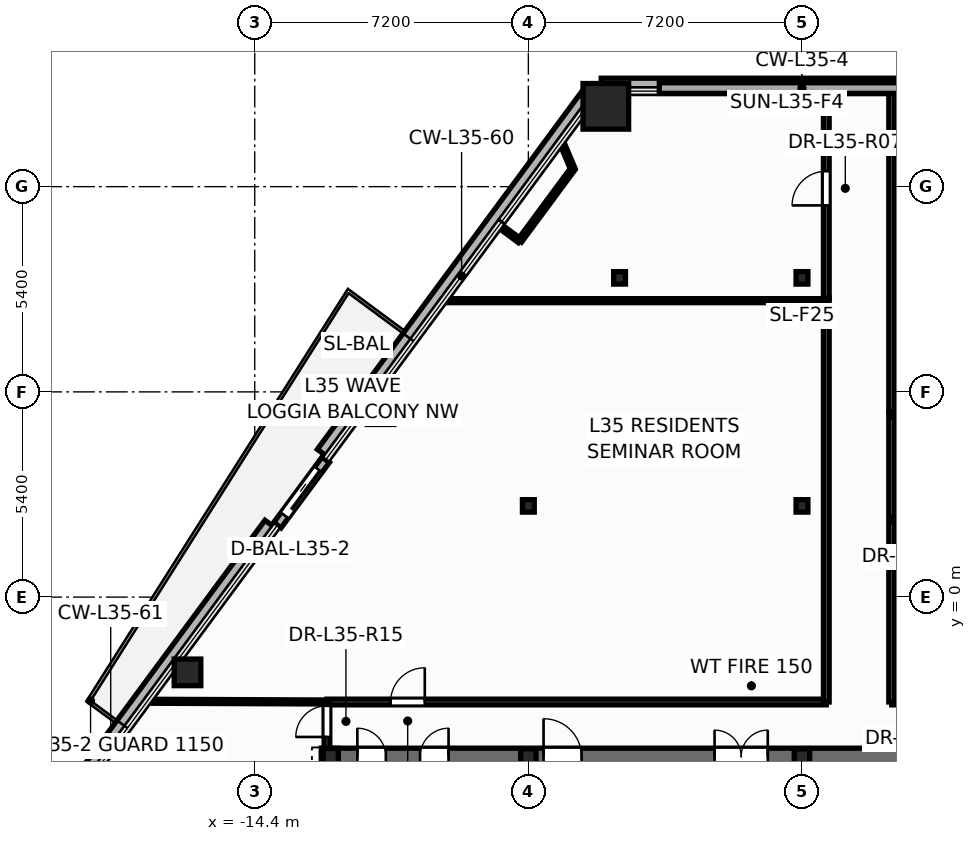
"""IFC4 building model, lengths in metres.
Left out: names, types, materials, properties, quantities, classifications, styles, units other than length and angle.
Written with IfcOpenShell. Run it as: python <this file> out.ifc"""

import sys

from ifc_helpers import new_model, si_unit, direction, frame, frame_2d, origin, origin_2d, place, context, subcontext, project, spatial, rectangle, hollow_rectangle, hollow_circle, i_section, extrude, element, fill, save


model = new_model("IFC4")
c1 = context("Model", 3, precision=1e-05, world=origin(), true_north=direction((0.0, 1.0)))
c2 = subcontext(c1, "Body", "Model", "MODEL_VIEW")
j1 = project(units=[si_unit("LENGTHUNIT", "METRE"), si_unit("PLANEANGLEUNIT", "RADIAN")], contexts=[c1])
p1 = place(None, origin())
s1 = spatial("IfcSite", under=j1, at=p1, CompositionType="ELEMENT")
p2 = place(p1, origin())
s2 = spatial("IfcBuilding", under=s1, at=p2, CompositionType="ELEMENT")
p3 = place(p2, frame((0.0, 0.0, 136.5)))
s3 = spatial("IfcBuildingStorey", under=s2, at=p3, CompositionType="ELEMENT", Elevation=136.5)
p4 = place(p3, frame((-5.162, 12.914, 0.0), z_axis=(0.0, 0.0, 1.0), x_axis=(1.0, 0.0, 0.0)))
e1 = element("IfcColumn", 1, at=p4, inside=s3, PredefinedType="COLUMN", context=c2, shape_type="SweptSolid", body=[
    extrude(hollow_rectangle(XDim=1.2, YDim=1.2, WallThickness=0.055, at=origin_2d()), origin(), (0.0, 0.0, 1.0), 3.6),
])
for number, where, z_axis, x_axis in (
    (2, (-11.089, 4.894, 0.0), (0.0, 0.0, 1.0), (1.0, 0.0, 0.0)),
    (3, (-16.169, -1.98, 0.0), (0.0, 0.0, 1.0), (1.0, 0.0, 0.0)),
):
    element("IfcColumn", number, at=place(p3, frame(where, z_axis=z_axis, x_axis=x_axis)), inside=s3, PredefinedType="COLUMN", context=c2, shape_type="SweptSolid", body=[
        extrude(hollow_circle(Radius=0.35, WallThickness=0.03, at=origin_2d()), origin(), (0.0, 0.0, 1.0), 3.6),
    ])
p5 = place(p3, frame((-12.4, -4.2, 0.0), z_axis=(0.0, 0.0, 1.0), x_axis=(1.0, 0.0, 0.0)))
e4 = element("IfcColumn", 4, at=p5, inside=s3, PredefinedType="COLUMN", context=c2, shape_type="SweptSolid", body=[
    extrude(i_section(OverallWidth=0.4, OverallDepth=0.44, WebThickness=0.028, FlangeThickness=0.04, at=origin_2d()), origin(), (0.0, 0.0, 1.0), 3.6),
])
for number, where, z_axis, x_axis in (
    (5, (-7.2, -4.2, 0.0), (0.0, 0.0, 1.0), (1.0, 0.0, 0.0)),
    (6, (0.0, -4.2, 0.0), (0.0, 0.0, 1.0), (1.0, 0.0, 0.0)),
):
    element("IfcColumn", number, at=place(p3, frame(where, z_axis=z_axis, x_axis=x_axis)), inside=s3, PredefinedType="PILASTER", context=c2, shape_type="SweptSolid", body=[
        extrude(i_section(OverallWidth=0.405, OverallDepth=0.414, WebThickness=0.022, FlangeThickness=0.032, at=origin_2d()), origin(), (0.0, 0.0, 1.0), 3.6),
    ])
for number, where, z_axis, x_axis in (
    (7, (-7.2, 2.4, 0.0), (0.0, 0.0, 1.0), (1.0, 0.0, 0.0)),
    (8, (0.0, 2.4, 0.0), (0.0, 0.0, 1.0), (1.0, 0.0, 0.0)),
    (9, (-4.8, 8.4, 0.0), (0.0, 0.0, 1.0), (1.0, 0.0, 0.0)),
    (10, (0.0, 8.4, 0.0), (0.0, 0.0, 1.0), (1.0, 0.0, 0.0)),
):
    element("IfcColumn", number, at=place(p3, frame(where, z_axis=z_axis, x_axis=x_axis)), inside=s3, PredefinedType="COLUMN", context=c2, shape_type="SweptSolid", body=[
        extrude(i_section(OverallWidth=0.311, OverallDepth=0.327, WebThickness=0.016, FlangeThickness=0.025, at=origin_2d()), origin(), (0.0, 0.0, 1.0), 3.6),
    ])
p6 = place(p3, frame((5.283, 13.473, -0.2), z_axis=(0.0, 0.0, 1.0), x_axis=(-1.0, 0.0, 0.0)))
e11 = element("IfcWall", 11, at=p6, inside=s3, PredefinedType="PARAPET", context=c2, shape_type="SweptSolid", body=[
    extrude(rectangle(XDim=10.566, YDim=0.36, at=frame_2d((5.283, 0.0))), origin(), (0.0, 0.0, 1.0), 0.38),
])
p7 = place(p3, frame((-5.563, 13.312, -0.2), z_axis=(0.0, 0.0, 1.0), x_axis=(-0.594365575478, -0.804194978029, 0.0)))
e12 = element("IfcWall", 12, at=p7, inside=s3, PredefinedType="PARAPET", context=c2, shape_type="SweptSolid", body=[
    extrude(rectangle(XDim=11.852, YDim=0.36, at=frame_2d((5.926, 0.0))), origin(), (0.0, 0.0, 1.0), 0.38),
])
p8 = place(p3, frame((-13.986, 1.915, -0.2), z_axis=(0.0, 0.0, 1.0), x_axis=(-0.594360924603, -0.804198415383, 0.0)))
e13 = element("IfcWall", 13, at=p8, inside=s3, PredefinedType="PARAPET", context=c2, shape_type="SweptSolid", body=[
    extrude(rectangle(XDim=14.578, YDim=0.36, at=frame_2d((7.289, 0.0))), origin(), (0.0, 0.0, 1.0), 0.38),
])
p9 = place(p3, frame((-12.532, 3.614, -0.015), z_axis=(0.0, 0.0, 1.0), x_axis=(-0.594381437757, -0.804183254271, 0.0)))
e14 = element("IfcWall", 14, at=p9, inside=s3, PredefinedType="STANDARD", context=c2, shape_type="SweptSolid", body=[
    extrude(rectangle(XDim=2.14, YDim=0.24, at=frame_2d((1.07, 0.0))), origin(), (0.0, 0.0, 1.0), 2.807),
])
p10 = place(p9, frame((0.32, 0.0, 0.015)))
e15 = element("IfcOpeningElement", 15, at=p10, cuts=e14, PredefinedType="OPENING", context=c2, shape_type="SweptSolid", body=[
    extrude(rectangle(XDim=1.506, YDim=2.204, at=frame_2d((0.75, 1.102))), frame((0.0, 0.13, 0.0), z_axis=(0.0, -1.0, 0.0), x_axis=(1.0, 0.0, 0.0)), (0.0, 0.0, 1.0), 0.26),
])
p11 = place(p3, frame((-12.65, -4.2, 0.0), z_axis=(0.0, 0.0, 1.0), x_axis=(1.0, 0.0, 0.0)))
e16 = element("IfcWall", 16, at=p11, inside=s3, PredefinedType="SHEAR", context=c2, shape_type="SweptSolid", body=[
    extrude(rectangle(XDim=25.3, YDim=0.45, at=frame_2d((12.65, 0.0))), origin(), (0.0, 0.0, 1.0), 3.6),
])
p12 = place(p11, frame((0.95, 0.0, 0.0)))
e17 = element("IfcOpeningElement", 17, at=p12, cuts=e16, PredefinedType="OPENING", context=c2, shape_type="SweptSolid", body=[
    extrude(rectangle(XDim=0.756, YDim=2.054, at=frame_2d((0.375, 1.027))), frame((0.0, 0.235, 0.0), z_axis=(0.0, -1.0, 0.0), x_axis=(1.0, 0.0, 0.0)), (0.0, 0.0, 1.0), 0.47),
])
p13 = place(p11, frame((2.6, 0.0, 0.0)))
e18 = element("IfcOpeningElement", 18, at=p13, cuts=e16, PredefinedType="OPENING", context=c2, shape_type="SweptSolid", body=[
    extrude(rectangle(XDim=0.756, YDim=2.054, at=frame_2d((0.375, 1.027))), frame((0.0, 0.235, 0.0), z_axis=(0.0, -1.0, 0.0), x_axis=(1.0, 0.0, 0.0)), (0.0, 0.0, 1.0), 0.47),
])
p14 = place(p11, frame((21.85, 0.0, 0.0)))
e19 = element("IfcOpeningElement", 19, at=p14, cuts=e16, PredefinedType="OPENING", context=c2, shape_type="SweptSolid", body=[
    extrude(rectangle(XDim=0.756, YDim=2.054, at=frame_2d((0.375, 1.027))), frame((0.0, 0.235, 0.0), z_axis=(0.0, -1.0, 0.0), x_axis=(1.0, 0.0, 0.0)), (0.0, 0.0, 1.0), 0.47),
])
p15 = place(p11, frame((23.5, 0.0, 0.0)))
e20 = element("IfcOpeningElement", 20, at=p15, cuts=e16, PredefinedType="OPENING", context=c2, shape_type="SweptSolid", body=[
    extrude(rectangle(XDim=0.756, YDim=2.054, at=frame_2d((0.375, 1.027))), frame((0.0, 0.235, 0.0), z_axis=(0.0, -1.0, 0.0), x_axis=(1.0, 0.0, 0.0)), (0.0, 0.0, 1.0), 0.47),
])
p16 = place(p11, frame((5.85, 0.0, 0.0)))
e21 = element("IfcOpeningElement", 21, at=p16, cuts=e16, PredefinedType="OPENING", context=c2, shape_type="SweptSolid", body=[
    extrude(rectangle(XDim=1.006, YDim=2.104, at=frame_2d((0.5, 1.052))), frame((0.0, 0.235, 0.0), z_axis=(0.0, -1.0, 0.0), x_axis=(1.0, 0.0, 0.0)), (0.0, 0.0, 1.0), 0.47),
])
p17 = place(p11, frame((10.35, 0.0, 0.0)))
e22 = element("IfcOpeningElement", 22, at=p17, cuts=e16, PredefinedType="OPENING", context=c2, shape_type="SweptSolid", body=[
    extrude(rectangle(XDim=1.406, YDim=2.154, at=frame_2d((0.7, 1.077))), frame((0.0, 0.235, 0.0), z_axis=(0.0, -1.0, 0.0), x_axis=(1.0, 0.0, 0.0)), (0.0, 0.0, 1.0), 0.47),
])
p18 = place(p11, frame((18.45, 0.0, 0.0)))
e23 = element("IfcOpeningElement", 23, at=p18, cuts=e16, PredefinedType="OPENING", context=c2, shape_type="SweptSolid", body=[
    extrude(rectangle(XDim=1.006, YDim=2.104, at=frame_2d((0.5, 1.052))), frame((0.0, 0.235, 0.0), z_axis=(0.0, -1.0, 0.0), x_axis=(1.0, 0.0, 0.0)), (0.0, 0.0, 1.0), 0.47),
])
p19 = place(p3, frame((-12.5, -2.76, 0.0), z_axis=(0.0, 0.0, 1.0), x_axis=(1.0, 0.0, 0.0)))
e24 = element("IfcWall", 24, at=p19, inside=s3, PredefinedType="PARTITIONING", context=c2, shape_type="SweptSolid", body=[
    extrude(rectangle(XDim=13.14, YDim=0.15, at=frame_2d((6.57, 0.0))), origin(), (0.0, 0.0, 1.0), 2.325),
])
p20 = place(p19, frame((1.675, 0.0, 0.0)))
e25 = element("IfcOpeningElement", 25, at=p20, cuts=e24, PredefinedType="OPENING", context=c2, shape_type="SweptSolid", body=[
    extrude(rectangle(XDim=0.906, YDim=2.104, at=frame_2d((0.45, 1.052))), frame((0.0, 0.085, 0.0), z_axis=(0.0, -1.0, 0.0), x_axis=(1.0, 0.0, 0.0)), (0.0, 0.0, 1.0), 0.17),
])
p21 = place(p3, frame((0.64, -2.76, 0.0), z_axis=(0.0, 0.0, 1.0), x_axis=(0.0, 1.0, 0.0)))
e26 = element("IfcWall", 26, at=p21, inside=s3, PredefinedType="PARTITIONING", context=c2, shape_type="SweptSolid", body=[
    extrude(rectangle(XDim=10.62, YDim=0.15, at=frame_2d((5.31, 0.0))), origin(), (0.0, 0.0, 1.0), 2.325),
])
p22 = place(p3, frame((-9.438, 7.8, 0.0), z_axis=(0.0, 0.0, 1.0), x_axis=(1.0, 0.0, 0.0)))
e27 = element("IfcWall", 27, at=p22, inside=s3, PredefinedType="PARTITIONING", context=c2, shape_type="SweptSolid", body=[
    extrude(rectangle(XDim=10.078, YDim=0.105, at=frame_2d((5.039, 0.0))), origin(), (0.0, 0.0, 1.0), 2.325),
])
p23 = place(p3, frame((2.36, 9.08, 0.0), z_axis=(0.0, 0.0, 1.0), x_axis=(1.0, 0.0, 0.0)))
e28 = element("IfcWall", 28, at=p23, inside=s3, PredefinedType="PARTITIONING", context=c2, shape_type="SweptSolid", body=[
    extrude(rectangle(XDim=6.132, YDim=0.105, at=frame_2d((3.066, 0.0))), origin(), (0.0, 0.0, 1.0), 2.617),
])
p24 = place(p23, frame((3.691, 0.0, 0.0)))
e29 = element("IfcOpeningElement", 29, at=p24, cuts=e28, PredefinedType="OPENING", context=c2, shape_type="SweptSolid", body=[
    extrude(rectangle(XDim=0.886, YDim=2.104, at=frame_2d((0.44, 1.052))), frame((0.0, 0.062, 0.0), z_axis=(0.0, -1.0, 0.0), x_axis=(1.0, 0.0, 0.0)), (0.0, 0.0, 1.0), 0.125),
])
p25 = place(p3, frame((2.36, -2.76, 0.0), z_axis=(0.0, 0.0, 1.0), x_axis=(1.0, 0.0, 0.0)))
e30 = element("IfcWall", 30, at=p25, inside=s3, PredefinedType="PARTITIONING", context=c2, shape_type="SweptSolid", body=[
    extrude(rectangle(XDim=6.1, YDim=0.15, at=frame_2d((3.05, 0.0))), origin(), (0.0, 0.0, 1.0), 2.325),
])
p26 = place(p25, frame((0.358, 0.0, 0.0)))
e31 = element("IfcOpeningElement", 31, at=p26, cuts=e30, PredefinedType="OPENING", context=c2, shape_type="SweptSolid", body=[
    extrude(rectangle(XDim=0.906, YDim=2.104, at=frame_2d((0.45, 1.052))), frame((0.0, 0.085, 0.0), z_axis=(0.0, -1.0, 0.0), x_axis=(1.0, 0.0, 0.0)), (0.0, 0.0, 1.0), 0.17),
])
p27 = place(p3, frame((0.64, 7.862, 0.0), z_axis=(0.0, 0.0, 1.0), x_axis=(0.0, 1.0, 0.0)))
e32 = element("IfcWall", 32, at=p27, inside=s3, PredefinedType="PARTITIONING", context=c2, shape_type="SweptSolid", body=[
    extrude(rectangle(XDim=5.451, YDim=0.15, at=frame_2d((2.726, 0.0))), origin(), (0.0, 0.0, 1.0), 2.617),
])
p28 = place(p27, frame((2.445, 0.0, 0.0)))
e33 = element("IfcOpeningElement", 33, at=p28, cuts=e32, PredefinedType="OPENING", context=c2, shape_type="SweptSolid", body=[
    extrude(rectangle(XDim=0.906, YDim=2.104, at=frame_2d((0.45, 1.052))), frame((0.0, 0.085, 0.0), z_axis=(0.0, -1.0, 0.0), x_axis=(1.0, 0.0, 0.0)), (0.0, 0.0, 1.0), 0.17),
])
p29 = place(p3, frame((2.36, -2.76, 0.0), z_axis=(0.0, 0.0, 1.0), x_axis=(0.0, 1.0, 0.0)))
e34 = element("IfcWall", 34, at=p29, inside=s3, PredefinedType="PARTITIONING", context=c2, shape_type="SweptSolid", body=[
    extrude(rectangle(XDim=7.62, YDim=0.15, at=frame_2d((3.81, 0.0))), origin(), (0.0, 0.0, 1.0), 2.325),
])
p30 = place(p3, frame((-17.228, -2.74, 0.0), z_axis=(0.0, 0.0, 1.0), x_axis=(0.999991471145, -0.004130089188, 0.0)))
e35 = element("IfcWall", 35, at=p30, inside=s3, PredefinedType="PARTITIONING", context=c2, shape_type="SweptSolid", body=[
    extrude(rectangle(XDim=4.788, YDim=0.105, at=frame_2d((2.394, 0.0))), origin(), (0.0, 0.0, 1.0), 2.792),
])
p31 = place(p3, frame((2.36, 4.862, 0.0), z_axis=(0.0, 0.0, 1.0), x_axis=(0.0, 1.0, 0.0)))
e36 = element("IfcWall", 36, at=p31, inside=s3, PredefinedType="PARTITIONING", context=c2, shape_type="SweptSolid", body=[
    extrude(rectangle(XDim=8.451, YDim=0.15, at=frame_2d((4.226, 0.0))), origin(), (0.0, 0.0, 1.0), 2.617),
])
p32 = place(p3, frame((-6.031, 11.267, 0.0), z_axis=(0.0, 0.0, 1.0), x_axis=(-0.594385220585, -0.804180458324, 0.0)))
e37 = element("IfcWall", 37, at=p32, inside=s3, PredefinedType="PARTITIONING", context=c2, shape_type="SweptSolid", body=[
    extrude(rectangle(XDim=2.351, YDim=0.12, at=frame_2d((1.175, 0.0))), origin(), (0.0, 0.0, 1.0), 3.35),
])
p33 = place(p3, frame((-12.5, -4.24, 0.0), z_axis=(0.0, 0.0, 1.0), x_axis=(0.0, 1.0, 0.0)))
e38 = element("IfcWall", 38, at=p33, inside=s3, PredefinedType="PARTITIONING", context=c2, shape_type="SweptSolid", body=[
    extrude(rectangle(XDim=1.48, YDim=0.15, at=frame_2d((0.74, 0.0))), origin(), (0.0, 0.0, 1.0), 2.325),
])
p34 = place(p33, frame((0.56, 0.0, 0.0)))
e39 = element("IfcOpeningElement", 39, at=p34, cuts=e38, PredefinedType="OPENING", context=c2, shape_type="SweptSolid", body=[
    extrude(rectangle(XDim=0.826, YDim=2.104, at=frame_2d((0.41, 1.052))), frame((0.0, 0.085, 0.0), z_axis=(0.0, -1.0, 0.0), x_axis=(1.0, 0.0, 0.0)), (0.0, 0.0, 1.0), 0.17),
])
p35 = place(p3, frame((2.36, 2.04, 0.0), z_axis=(0.0, 0.0, 1.0), x_axis=(1.0, 0.0, 0.0)))
e40 = element("IfcWall", 40, at=p35, inside=s3, PredefinedType="PARTITIONING", context=c2, shape_type="SweptSolid", body=[
    extrude(rectangle(XDim=1.358, YDim=0.135, at=frame_2d((0.679, 0.0))), origin(), (0.0, 0.0, 1.0), 2.919),
])
p36 = place(p35, frame((0.311, 0.0, 0.0)))
e41 = element("IfcOpeningElement", 41, at=p36, cuts=e40, PredefinedType="OPENING", context=c2, shape_type="SweptSolid", body=[
    extrude(rectangle(XDim=0.826, YDim=2.104, at=frame_2d((0.41, 1.052))), frame((0.0, 0.078, 0.0), z_axis=(0.0, -1.0, 0.0), x_axis=(1.0, 0.0, 0.0)), (0.0, 0.0, 1.0), 0.155),
])
p37 = place(p3, frame((2.36, 4.8, 0.0), z_axis=(0.0, 0.0, 1.0), x_axis=(1.0, 0.0, 0.0)))
e42 = element("IfcWall", 42, at=p37, inside=s3, PredefinedType="PARTITIONING", context=c2, shape_type="SweptSolid", body=[
    extrude(rectangle(XDim=1.42, YDim=0.135, at=frame_2d((0.71, 0.0))), origin(), (0.0, 0.0, 1.0), 2.919),
])
p38 = place(p3, frame((0.64, 11.8, 0.0), z_axis=(0.0, 0.0, 1.0), x_axis=(1.0, 0.0, 0.0)))
e43 = element("IfcWall", 43, at=p38, inside=s3, PredefinedType="PARTITIONING", context=c2, shape_type="SweptSolid", body=[
    extrude(rectangle(XDim=1.72, YDim=0.15, at=frame_2d((0.86, 0.0))), origin(), (0.0, 0.0, 1.0), 3.35),
])
p39 = place(p3, frame((-6.334, 11.984, 0.0), z_axis=(0.0, 0.0, 1.0), x_axis=(0.389486531809, -0.921032160969, 0.0)))
e44 = element("IfcWall", 44, at=p39, inside=s3, PredefinedType="PARTITIONING", context=c2, shape_type="SweptSolid", body=[
    extrude(rectangle(XDim=0.779, YDim=0.12, at=frame_2d((0.389, 0.0))), origin(), (0.0, 0.0, 1.0), 2.792),
])
p40 = place(p3, frame((-7.428, 9.376, 0.0), z_axis=(0.0, 0.0, 1.0), x_axis=(-0.804221577226, 0.594329584257, 0.0)))
e45 = element("IfcWall", 45, at=p40, inside=s3, PredefinedType="PARTITIONING", context=c2, shape_type="SweptSolid", body=[
    extrude(rectangle(XDim=0.67, YDim=0.12, at=frame_2d((0.335, 0.0))), origin(), (0.0, 0.0, 1.0), 2.792),
])
p41 = place(p10, origin())
e46 = element("IfcDoor", 46, at=p41, inside=s3, OperationType="SLIDING_TO_RIGHT", PredefinedType="DOOR", context=c2, shape_type="SweptSolid", body=[
    extrude(rectangle(XDim=1.5, YDim=2.2, at=frame_2d((0.75, 1.1))), frame((0.0, 0.025, 0.0), z_axis=(0.0, -1.0, 0.0), x_axis=(1.0, 0.0, 0.0)), (0.0, 0.0, 1.0), 0.05),
])
fill(e15, e46)
p42 = place(p12, origin())
e47 = element("IfcDoor", 47, at=p42, inside=s3, OperationType="SINGLE_SWING_LEFT", PredefinedType="DOOR", context=c2, shape_type="SweptSolid", body=[
    extrude(rectangle(XDim=0.75, YDim=2.05, at=frame_2d((0.375, 1.025))), frame((0.0, 0.025, 0.0), z_axis=(0.0, -1.0, 0.0), x_axis=(1.0, 0.0, 0.0)), (0.0, 0.0, 1.0), 0.05),
])
fill(e17, e47)
p43 = place(p13, origin())
e48 = element("IfcDoor", 48, at=p43, inside=s3, OperationType="SINGLE_SWING_RIGHT", PredefinedType="DOOR", context=c2, shape_type="SweptSolid", body=[
    extrude(rectangle(XDim=0.75, YDim=2.05, at=frame_2d((0.375, 1.025))), frame((0.0, 0.025, 0.0), z_axis=(0.0, -1.0, 0.0), x_axis=(1.0, 0.0, 0.0)), (0.0, 0.0, 1.0), 0.05),
])
fill(e18, e48)
p44 = place(p16, origin())
e49 = element("IfcDoor", 49, at=p44, inside=s3, OperationType="SINGLE_SWING_LEFT", PredefinedType="DOOR", context=c2, shape_type="SweptSolid", body=[
    extrude(rectangle(XDim=1.0, YDim=2.1, at=frame_2d((0.5, 1.05))), frame((0.0, 0.025, 0.0), z_axis=(0.0, -1.0, 0.0), x_axis=(1.0, 0.0, 0.0)), (0.0, 0.0, 1.0), 0.05),
])
fill(e21, e49)
p45 = place(p17, origin())
e50 = element("IfcDoor", 50, at=p45, inside=s3, OperationType="DOUBLE_DOOR_SINGLE_SWING", PredefinedType="DOOR", context=c2, shape_type="SweptSolid", body=[
    extrude(rectangle(XDim=1.4, YDim=2.15, at=frame_2d((0.7, 1.075))), frame((0.0, 0.025, 0.0), z_axis=(0.0, -1.0, 0.0), x_axis=(1.0, 0.0, 0.0)), (0.0, 0.0, 1.0), 0.05),
])
fill(e22, e50)
p46 = place(p20, origin())
e51 = element("IfcDoor", 51, at=p46, inside=s3, OperationType="SINGLE_SWING_RIGHT", PredefinedType="DOOR", context=c2, shape_type="SweptSolid", body=[
    extrude(rectangle(XDim=0.9, YDim=2.1, at=frame_2d((0.45, 1.05))), frame((0.0, 0.025, 0.0), z_axis=(0.0, -1.0, 0.0), x_axis=(1.0, 0.0, 0.0)), (0.0, 0.0, 1.0), 0.05),
])
fill(e25, e51)
p47 = place(p28, origin())
e52 = element("IfcDoor", 52, at=p47, inside=s3, OperationType="SINGLE_SWING_LEFT", PredefinedType="DOOR", context=c2, shape_type="SweptSolid", body=[
    extrude(rectangle(XDim=0.9, YDim=2.1, at=frame_2d((0.45, 1.05))), frame((0.0, 0.025, 0.0), z_axis=(0.0, -1.0, 0.0), x_axis=(1.0, 0.0, 0.0)), (0.0, 0.0, 1.0), 0.05),
])
fill(e33, e52)
p48 = place(p34, origin())
e53 = element("IfcDoor", 53, at=p48, inside=s3, OperationType="SINGLE_SWING_LEFT", PredefinedType="DOOR", context=c2, shape_type="SweptSolid", body=[
    extrude(rectangle(XDim=0.82, YDim=2.1, at=frame_2d((0.41, 1.05))), frame((0.0, 0.025, 0.0), z_axis=(0.0, -1.0, 0.0), x_axis=(1.0, 0.0, 0.0)), (0.0, 0.0, 1.0), 0.05),
])
fill(e39, e53)
save(model, sys.argv[1])
